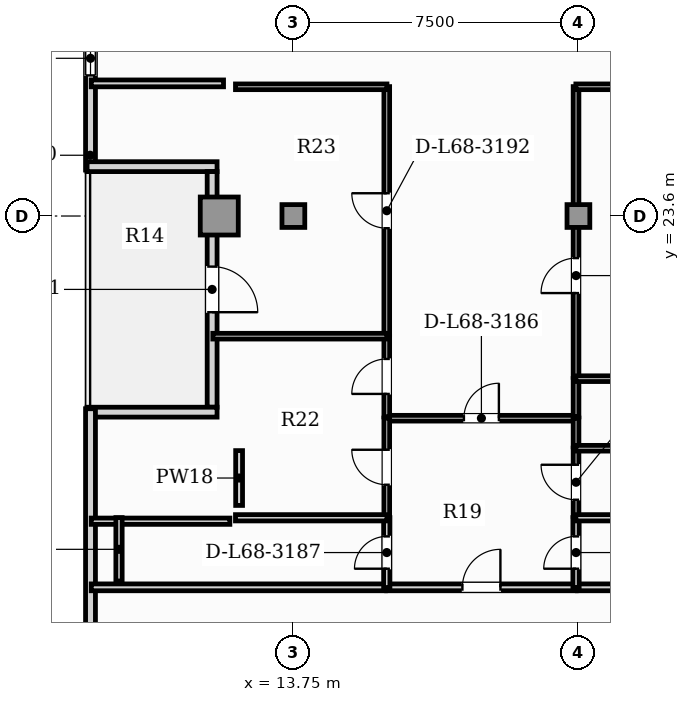
"""IFC4 building model, lengths in metres.
Left out: names, types, materials, properties, quantities, classifications, styles, units other than length and angle.
Written with IfcOpenShell. Run it as: python <this file> out.ifc"""

import sys

from ifc_helpers import new_model, si_unit, direction, frame, frame_2d, origin, origin_2d, place, context, subcontext, project, spatial, rectangle, hollow_rectangle, extrude, element, fill, save


model = new_model("IFC4")
c1 = context("Model", 3, precision=1e-05, world=origin(), true_north=direction((0.0, 1.0)))
c2 = subcontext(c1, "Body", "Model", "MODEL_VIEW")
j1 = project(units=[si_unit("LENGTHUNIT", "METRE"), si_unit("PLANEANGLEUNIT", "RADIAN")], contexts=[c1])
p1 = place(None, origin())
s1 = spatial("IfcSite", under=j1, at=p1, CompositionType="ELEMENT")
p2 = place(p1, origin())
s2 = spatial("IfcBuilding", under=s1, at=p2, CompositionType="ELEMENT")
p3 = place(p2, frame((0.0, 0.0, 276.0)))
s3 = spatial("IfcBuildingStorey", under=s2, at=p3, CompositionType="ELEMENT", Elevation=276.0)
p4 = place(p3, frame((11.8, 23.6, 0.0), z_axis=(0.0, 0.0, 1.0), x_axis=(1.0, 0.0, 0.0)))
e1 = element("IfcColumn", 1, at=p4, inside=s3, PredefinedType="USERDEFINED", context=c2, shape_type="SweptSolid", body=[
    extrude(hollow_rectangle(XDim=1.0, YDim=1.0, WallThickness=0.06, at=origin_2d()), origin(), (0.0, 0.0, 1.0), 5.05),
])
for number, where, z_axis, x_axis in (
    (2, (13.75, 23.6, 0.0), (0.0, 0.0, 1.0), (1.0, 0.0, 0.0)),
    (3, (21.25, 23.6, 0.0), (0.0, 0.0, 1.0), (1.0, 0.0, 0.0)),
):
    element("IfcColumn", number, at=place(p3, frame(where, z_axis=z_axis, x_axis=x_axis)), inside=s3, PredefinedType="COLUMN", context=c2, shape_type="SweptSolid", body=[
        extrude(rectangle(XDim=0.6, YDim=0.6, at=origin_2d()), origin(), (0.0, 0.0, 1.0), 5.05),
    ])
p5 = place(p3, frame((8.412, 31.698, 0.0), z_axis=(0.0, 0.0, 1.0), x_axis=(0.0, -1.0, 0.0)))
e4 = element("IfcWall", 4, at=p5, inside=s3, PredefinedType="SOLIDWALL", context=c2, shape_type="SweptSolid", body=[
    extrude(rectangle(XDim=6.889, YDim=0.26, at=frame_2d((3.444, 0.0))), origin(), (0.0, 0.0, 1.0), 4.85),
])
p6 = place(p5, frame((3.498, 0.0, 0.95)))
e5 = element("IfcOpeningElement", 5, at=p6, cuts=e4, PredefinedType="OPENING", context=c2, shape_type="SweptSolid", body=[
    extrude(rectangle(XDim=0.9, YDim=1.5, at=frame_2d((0.45, 0.75))), frame((0.0, 0.14, 0.0), z_axis=(0.0, -1.0, 0.0), x_axis=(1.0, 0.0, 0.0)), (0.0, 0.0, 1.0), 0.28),
])
p7 = place(p3, frame((8.322, 24.899, 0.0), z_axis=(0.0, 0.0, 1.0), x_axis=(1.0, 0.0, 0.0)))
e6 = element("IfcWall", 6, at=p7, inside=s3, PredefinedType="SOLIDWALL", context=c2, shape_type="SweptSolid", body=[
    extrude(rectangle(XDim=3.42, YDim=0.26, at=frame_2d((1.71, 0.0))), origin(), (0.0, 0.0, 1.0), 4.85),
])
p8 = place(p3, frame((11.612, 24.769, 0.0), z_axis=(0.0, 0.0, 1.0), x_axis=(0.0, -1.0, 0.0)))
e7 = element("IfcWall", 7, at=p8, inside=s3, PredefinedType="SOLIDWALL", context=c2, shape_type="SweptSolid", body=[
    extrude(rectangle(XDim=6.2, YDim=0.26, at=frame_2d((3.1, 0.0))), origin(), (0.0, 0.0, 1.0), 4.39),
])
p9 = place(p8, frame((2.5, 0.0, 0.0)))
e8 = element("IfcOpeningElement", 8, at=p9, cuts=e7, PredefinedType="OPENING", context=c2, shape_type="SweptSolid", body=[
    extrude(rectangle(XDim=1.2, YDim=2.2, at=frame_2d((0.6, 1.1))), frame((0.0, 0.14, 0.0), z_axis=(0.0, -1.0, 0.0), x_axis=(1.0, 0.0, 0.0)), (0.0, 0.0, 1.0), 0.28),
])
p10 = place(p3, frame((11.742, 18.439, 0.0), z_axis=(0.0, 0.0, 1.0), x_axis=(-1.0, 0.0, 0.0)))
e9 = element("IfcWall", 9, at=p10, inside=s3, PredefinedType="SOLIDWALL", context=c2, shape_type="SweptSolid", body=[
    extrude(rectangle(XDim=3.42, YDim=0.26, at=frame_2d((1.71, 0.0))), origin(), (0.0, 0.0, 1.0), 4.85),
])
p11 = place(p3, frame((8.412, 18.529, 0.0), z_axis=(0.0, 0.0, 1.0), x_axis=(0.0, -1.0, 0.0)))
e10 = element("IfcWall", 10, at=p11, inside=s3, PredefinedType="SOLIDWALL", context=c2, shape_type="SweptSolid", body=[
    extrude(rectangle(XDim=15.289, YDim=0.26, at=frame_2d((7.645, 0.0))), origin(), (0.0, 0.0, 1.0), 4.85),
])
p12 = place(p11, frame((9.239, 0.0, 0.85)))
e11 = element("IfcOpeningElement", 11, at=p12, cuts=e10, PredefinedType="OPENING", context=c2, shape_type="SweptSolid", body=[
    extrude(rectangle(XDim=2.4, YDim=2.0, at=frame_2d((1.2, 1.0))), frame((0.0, 0.14, 0.0), z_axis=(0.0, -1.0, 0.0), x_axis=(1.0, 0.0, 0.0)), (0.0, 0.0, 1.0), 0.28),
])
p13 = place(p3, frame((16.202, 13.83, 0.0), z_axis=(0.0, 0.0, 1.0), x_axis=(1.0, 0.0, 0.0)))
e12 = element("IfcWall", 12, at=p13, inside=s3, PredefinedType="PARTITIONING", context=c2, shape_type="SweptSolid", body=[
    extrude(rectangle(XDim=4.99, YDim=0.18, at=frame_2d((2.495, 0.0))), origin(), (0.0, 0.0, 1.0), 4.85),
])
p14 = place(p13, frame((1.995, 0.0, 0.0)))
e13 = element("IfcOpeningElement", 13, at=p14, cuts=e12, PredefinedType="OPENING", context=c2, shape_type="SweptSolid", body=[
    extrude(rectangle(XDim=1.0, YDim=2.15, at=frame_2d((0.5, 1.075))), frame((0.0, 0.1, 0.0), z_axis=(0.0, -1.0, 0.0), x_axis=(1.0, 0.0, 0.0)), (0.0, 0.0, 1.0), 0.2),
])
p15 = place(p3, frame((8.431, 13.83, 0.0), z_axis=(0.0, 0.0, 1.0), x_axis=(1.0, 0.0, 0.0)))
e14 = element("IfcWall", 14, at=p15, inside=s3, PredefinedType="PARTITIONING", context=c2, shape_type="SweptSolid", body=[
    extrude(rectangle(XDim=7.741, YDim=0.18, at=frame_2d((3.871, 0.0))), origin(), (0.0, 0.0, 1.0), 4.85),
])
p16 = place(p3, frame((21.222, 13.83, 0.0), z_axis=(0.0, 0.0, 1.0), x_axis=(1.0, 0.0, 0.0)))
e15 = element("IfcWall", 15, at=p16, inside=s3, PredefinedType="PARTITIONING", context=c2, shape_type="SweptSolid", body=[
    extrude(rectangle(XDim=7.185, YDim=0.18, at=frame_2d((3.593, 0.0))), origin(), (0.0, 0.0, 1.0), 4.85),
])
p17 = place(p3, frame((16.202, 18.28, 0.0), z_axis=(0.0, 0.0, 1.0), x_axis=(1.0, 0.0, 0.0)))
e16 = element("IfcWall", 16, at=p17, inside=s3, PredefinedType="PARTITIONING", context=c2, shape_type="SweptSolid", body=[
    extrude(rectangle(XDim=4.99, YDim=0.15, at=frame_2d((2.495, 0.0))), origin(), (0.0, 0.0, 1.0), 4.85),
])
p18 = place(p17, frame((2.035, 0.0, 0.0)))
e17 = element("IfcOpeningElement", 17, at=p18, cuts=e16, PredefinedType="OPENING", context=c2, shape_type="SweptSolid", body=[
    extrude(rectangle(XDim=0.92, YDim=2.1, at=frame_2d((0.46, 1.05))), frame((0.0, 0.085, 0.0), z_axis=(0.0, -1.0, 0.0), x_axis=(1.0, 0.0, 0.0)), (0.0, 0.0, 1.0), 0.17),
])
p19 = place(p3, frame((16.208, 13.825, 0.0), z_axis=(0.0, 0.0, 1.0), x_axis=(0.0, 1.0, 0.0)))
e18 = element("IfcWall", 18, at=p19, inside=s3, PredefinedType="PLUMBINGWALL", context=c2, shape_type="SweptSolid", body=[
    extrude(rectangle(XDim=1.84, YDim=0.165, at=frame_2d((0.92, 0.0))), origin(), (0.0, 0.0, 1.0), 4.85),
])
p20 = place(p19, frame((0.495, 0.0, 0.0)))
e19 = element("IfcOpeningElement", 19, at=p20, cuts=e18, PredefinedType="OPENING", context=c2, shape_type="SweptSolid", body=[
    extrude(rectangle(XDim=0.85, YDim=2.1, at=frame_2d((0.425, 1.05))), frame((0.0, 0.093, 0.0), z_axis=(0.0, -1.0, 0.0), x_axis=(1.0, 0.0, 0.0)), (0.0, 0.0, 1.0), 0.185),
])
p21 = place(p3, frame((16.208, 15.695, 0.0), z_axis=(0.0, 0.0, 1.0), x_axis=(0.0, 1.0, 0.0)))
e20 = element("IfcWall", 20, at=p21, inside=s3, PredefinedType="PARTITIONING", context=c2, shape_type="SweptSolid", body=[
    extrude(rectangle(XDim=2.59, YDim=0.15, at=frame_2d((1.295, 0.0))), origin(), (0.0, 0.0, 1.0), 4.85),
])
p22 = place(p21, frame((0.835, 0.0, 0.0)))
e21 = element("IfcOpeningElement", 21, at=p22, cuts=e20, PredefinedType="OPENING", context=c2, shape_type="SweptSolid", body=[
    extrude(rectangle(XDim=0.92, YDim=2.1, at=frame_2d((0.46, 1.05))), frame((0.0, 0.085, 0.0), z_axis=(0.0, -1.0, 0.0), x_axis=(1.0, 0.0, 0.0)), (0.0, 0.0, 1.0), 0.17),
])
p23 = place(p3, frame((21.188, 13.825, 0.0), z_axis=(0.0, 0.0, 1.0), x_axis=(0.0, 1.0, 0.0)))
e22 = element("IfcWall", 22, at=p23, inside=s3, PredefinedType="PLUMBINGWALL", context=c2, shape_type="SweptSolid", body=[
    extrude(rectangle(XDim=1.84, YDim=0.165, at=frame_2d((0.92, 0.0))), origin(), (0.0, 0.0, 1.0), 4.495),
])
p24 = place(p23, frame((0.495, 0.0, 0.0)))
e23 = element("IfcOpeningElement", 23, at=p24, cuts=e22, PredefinedType="OPENING", context=c2, shape_type="SweptSolid", body=[
    extrude(rectangle(XDim=0.85, YDim=2.1, at=frame_2d((0.425, 1.05))), frame((0.0, 0.093, 0.0), z_axis=(0.0, -1.0, 0.0), x_axis=(1.0, 0.0, 0.0)), (0.0, 0.0, 1.0), 0.185),
])
p25 = place(p3, frame((21.188, 15.695, 0.0), z_axis=(0.0, 0.0, 1.0), x_axis=(0.0, 1.0, 0.0)))
e24 = element("IfcWall", 24, at=p25, inside=s3, PredefinedType="PARTITIONING", context=c2, shape_type="SweptSolid", body=[
    extrude(rectangle(XDim=1.8, YDim=0.15, at=frame_2d((0.9, 0.0))), origin(), (0.0, 0.0, 1.0), 4.495),
])
p26 = place(p25, frame((0.44, 0.0, 0.0)))
e25 = element("IfcOpeningElement", 25, at=p26, cuts=e24, PredefinedType="OPENING", context=c2, shape_type="SweptSolid", body=[
    extrude(rectangle(XDim=0.92, YDim=2.1, at=frame_2d((0.46, 1.05))), frame((0.0, 0.085, 0.0), z_axis=(0.0, -1.0, 0.0), x_axis=(1.0, 0.0, 0.0)), (0.0, 0.0, 1.0), 0.17),
])
p27 = place(p3, frame((21.188, 17.525, 0.0), z_axis=(0.0, 0.0, 1.0), x_axis=(0.0, 1.0, 0.0)))
e26 = element("IfcWall", 26, at=p27, inside=s3, PredefinedType="PARTITIONING", context=c2, shape_type="SweptSolid", body=[
    extrude(rectangle(XDim=0.76, YDim=0.15, at=frame_2d((0.38, 0.0))), origin(), (0.0, 0.0, 1.0), 4.495),
])
p28 = place(p3, frame((16.208, 18.315, 0.0), z_axis=(0.0, 0.0, 1.0), x_axis=(0.0, 1.0, 0.0)))
e27 = element("IfcWall", 27, at=p28, inside=s3, PredefinedType="PARTITIONING", context=c2, shape_type="SweptSolid", body=[
    extrude(rectangle(XDim=2.128, YDim=0.15, at=frame_2d((1.064, 0.0))), origin(), (0.0, 0.0, 1.0), 4.85),
])
p29 = place(p28, frame((0.604, 0.0, 0.0)))
e28 = element("IfcOpeningElement", 28, at=p29, cuts=e27, PredefinedType="OPENING", context=c2, shape_type="SweptSolid", body=[
    extrude(rectangle(XDim=0.92, YDim=2.1, at=frame_2d((0.46, 1.05))), frame((0.0, 0.085, 0.0), z_axis=(0.0, -1.0, 0.0), x_axis=(1.0, 0.0, 0.0)), (0.0, 0.0, 1.0), 0.17),
])
p30 = place(p3, frame((16.208, 20.473, 0.0), z_axis=(0.0, 0.0, 1.0), x_axis=(0.0, 1.0, 0.0)))
e29 = element("IfcWall", 29, at=p30, inside=s3, PredefinedType="PARTITIONING", context=c2, shape_type="SweptSolid", body=[
    extrude(rectangle(XDim=6.532, YDim=0.15, at=frame_2d((3.266, 0.0))), origin(), (0.0, 0.0, 1.0), 4.85),
])
p31 = place(p30, frame((2.806, 0.0, 0.0)))
e30 = element("IfcOpeningElement", 30, at=p31, cuts=e29, PredefinedType="OPENING", context=c2, shape_type="SweptSolid", body=[
    extrude(rectangle(XDim=0.92, YDim=2.1, at=frame_2d((0.46, 1.05))), frame((0.0, 0.085, 0.0), z_axis=(0.0, -1.0, 0.0), x_axis=(1.0, 0.0, 0.0)), (0.0, 0.0, 1.0), 0.17),
])
p32 = place(p3, frame((12.227, 27.0, 0.0), z_axis=(0.0, 0.0, 1.0), x_axis=(1.0, 0.0, 0.0)))
e31 = element("IfcWall", 31, at=p32, inside=s3, PredefinedType="PARTITIONING", context=c2, shape_type="SweptSolid", body=[
    extrude(rectangle(XDim=3.985, YDim=0.15, at=frame_2d((1.993, 0.0))), origin(), (0.0, 0.0, 1.0), 4.85),
])
p33 = place(p3, frame((21.188, 18.315, 0.0), z_axis=(0.0, 0.0, 1.0), x_axis=(0.0, 1.0, 0.0)))
e32 = element("IfcWall", 32, at=p33, inside=s3, PredefinedType="PARTITIONING", context=c2, shape_type="SweptSolid", body=[
    extrude(rectangle(XDim=1.01, YDim=0.15, at=frame_2d((0.505, 0.0))), origin(), (0.0, 0.0, 1.0), 4.495),
])
p34 = place(p3, frame((21.188, 19.355, 0.0), z_axis=(0.0, 0.0, 1.0), x_axis=(0.0, 1.0, 0.0)))
e33 = element("IfcWall", 33, at=p34, inside=s3, PredefinedType="PARTITIONING", context=c2, shape_type="SweptSolid", body=[
    extrude(rectangle(XDim=7.65, YDim=0.15, at=frame_2d((3.825, 0.0))), origin(), (0.0, 0.0, 1.0), 4.495),
])
p35 = place(p34, frame((2.218, 0.0, 0.0)))
e34 = element("IfcOpeningElement", 34, at=p35, cuts=e33, PredefinedType="OPENING", context=c2, shape_type="SweptSolid", body=[
    extrude(rectangle(XDim=0.92, YDim=2.1, at=frame_2d((0.46, 1.05))), frame((0.0, 0.085, 0.0), z_axis=(0.0, -1.0, 0.0), x_axis=(1.0, 0.0, 0.0)), (0.0, 0.0, 1.0), 0.17),
])
p36 = place(p3, frame((21.183, 27.0, 0.0), z_axis=(0.0, 0.0, 1.0), x_axis=(1.0, 0.0, 0.0)))
e35 = element("IfcWall", 35, at=p36, inside=s3, PredefinedType="PARTITIONING", context=c2, shape_type="SweptSolid", body=[
    extrude(rectangle(XDim=7.225, YDim=0.15, at=frame_2d((3.613, 0.0))), origin(), (0.0, 0.0, 1.0), 4.85),
])
p37 = place(p3, frame((12.227, 15.66, 0.0), z_axis=(0.0, 0.0, 1.0), x_axis=(1.0, 0.0, 0.0)))
e36 = element("IfcWall", 36, at=p37, inside=s3, PredefinedType="PLUMBINGWALL", context=c2, shape_type="SweptSolid", body=[
    extrude(rectangle(XDim=3.985, YDim=0.165, at=frame_2d((1.993, 0.0))), origin(), (0.0, 0.0, 1.0), 4.85),
])
p38 = place(p3, frame((11.632, 20.438, 0.0), z_axis=(0.0, 0.0, 1.0), x_axis=(1.0, 0.0, 0.0)))
e37 = element("IfcWall", 37, at=p38, inside=s3, PredefinedType="PARTITIONING", context=c2, shape_type="SweptSolid", body=[
    extrude(rectangle(XDim=4.581, YDim=0.15, at=frame_2d((2.291, 0.0))), origin(), (0.0, 0.0, 1.0), 4.85),
])
p39 = place(p3, frame((21.183, 15.66, 0.0), z_axis=(0.0, 0.0, 1.0), x_axis=(1.0, 0.0, 0.0)))
e38 = element("IfcWall", 38, at=p39, inside=s3, PredefinedType="PLUMBINGWALL", context=c2, shape_type="SweptSolid", body=[
    extrude(rectangle(XDim=7.225, YDim=0.165, at=frame_2d((3.613, 0.0))), origin(), (0.0, 0.0, 1.0), 4.85),
])
p40 = place(p3, frame((21.183, 17.49, 0.0), z_axis=(0.0, 0.0, 1.0), x_axis=(1.0, 0.0, 0.0)))
e39 = element("IfcWall", 39, at=p40, inside=s3, PredefinedType="PARTITIONING", context=c2, shape_type="SweptSolid", body=[
    extrude(rectangle(XDim=7.225, YDim=0.15, at=frame_2d((3.613, 0.0))), origin(), (0.0, 0.0, 1.0), 4.85),
])
p41 = place(p40, frame((3.153, 0.0, 0.0)))
e40 = element("IfcOpeningElement", 40, at=p41, cuts=e39, PredefinedType="OPENING", context=c2, shape_type="SweptSolid", body=[
    extrude(rectangle(XDim=0.92, YDim=2.1, at=frame_2d((0.46, 1.05))), frame((0.0, 0.085, 0.0), z_axis=(0.0, -1.0, 0.0), x_axis=(1.0, 0.0, 0.0)), (0.0, 0.0, 1.0), 0.17),
])
p42 = place(p3, frame((21.183, 19.32, 0.0), z_axis=(0.0, 0.0, 1.0), x_axis=(1.0, 0.0, 0.0)))
e41 = element("IfcWall", 41, at=p42, inside=s3, PredefinedType="PARTITIONING", context=c2, shape_type="SweptSolid", body=[
    extrude(rectangle(XDim=7.225, YDim=0.15, at=frame_2d((3.613, 0.0))), origin(), (0.0, 0.0, 1.0), 4.85),
])
p43 = place(p3, frame((11.912, 27.09, 0.0), z_axis=(0.0, 0.0, 1.0), x_axis=(-1.0, 0.0, 0.0)))
e42 = element("IfcWall", 42, at=p43, inside=s3, PredefinedType="PARTITIONING", context=c2, shape_type="SweptSolid", body=[
    extrude(rectangle(XDim=3.481, YDim=0.18, at=frame_2d((1.74, 0.0))), origin(), (0.0, 0.0, 1.0), 4.85),
])
p44 = place(p3, frame((8.431, 15.57, 0.0), z_axis=(0.0, 0.0, 1.0), x_axis=(1.0, 0.0, 0.0)))
e43 = element("IfcWall", 43, at=p44, inside=s3, PredefinedType="PLUMBINGWALL", context=c2, shape_type="SweptSolid", body=[
    extrude(rectangle(XDim=3.647, YDim=0.165, at=frame_2d((1.823, 0.0))), origin(), (0.0, 0.0, 1.0), 4.85),
])
p45 = place(p3, frame((9.162, 13.995, 0.0), z_axis=(0.0, 0.0, 1.0), x_axis=(0.0, 1.0, 0.0)))
e44 = element("IfcWall", 44, at=p45, inside=s3, PredefinedType="PLUMBINGWALL", context=c2, shape_type="SweptSolid", body=[
    extrude(rectangle(XDim=1.67, YDim=0.165, at=frame_2d((0.835, 0.0))), origin(), (0.0, 0.0, 1.0), 4.85),
])
p46 = place(p3, frame((12.322, 15.985, 0.0), z_axis=(0.0, 0.0, 1.0), x_axis=(0.0, 1.0, 0.0)))
e45 = element("IfcWall", 45, at=p46, inside=s3, PredefinedType="PARTITIONING", context=c2, shape_type="SweptSolid", body=[
    extrude(rectangle(XDim=1.442, YDim=0.18, at=frame_2d((0.721, 0.0))), origin(), (0.0, 0.0, 1.0), 4.85),
])
p47 = place(p9, frame((1.2, 0.0, 0.0), z_axis=(0.0, 0.0, 1.0), x_axis=(-1.0, 0.0, 0.0)))
e46 = element("IfcDoor", 46, at=p47, inside=s3, OperationType="SINGLE_SWING_LEFT", PredefinedType="DOOR", context=c2, shape_type="SweptSolid", body=[
    extrude(rectangle(XDim=1.2, YDim=2.2, at=frame_2d((0.6, 1.1))), frame((0.0, 0.025, 0.0), z_axis=(0.0, -1.0, 0.0), x_axis=(1.0, 0.0, 0.0)), (0.0, 0.0, 1.0), 0.05),
])
fill(e8, e46)
p48 = place(p6, origin())
e47 = element("IfcWindow", 47, at=p48, inside=s3, PartitioningType="SINGLE_PANEL", PredefinedType="WINDOW", context=c2, shape_type="SweptSolid", body=[
    extrude(rectangle(XDim=0.9, YDim=1.5, at=frame_2d((0.45, 0.75))), frame((0.0, 0.03, 0.0), z_axis=(0.0, -1.0, 0.0), x_axis=(1.0, 0.0, 0.0)), (0.0, 0.0, 1.0), 0.06),
])
fill(e5, e47)
p49 = place(p14, origin())
e48 = element("IfcDoor", 48, at=p49, inside=s3, OperationType="SINGLE_SWING_RIGHT", PredefinedType="DOOR", context=c2, shape_type="SweptSolid", body=[
    extrude(rectangle(XDim=1.0, YDim=2.15, at=frame_2d((0.5, 1.075))), frame((0.0, 0.025, 0.0), z_axis=(0.0, -1.0, 0.0), x_axis=(1.0, 0.0, 0.0)), (0.0, 0.0, 1.0), 0.05),
])
fill(e13, e48)
p50 = place(p18, origin())
e49 = element("IfcDoor", 49, at=p50, inside=s3, OperationType="SINGLE_SWING_RIGHT", PredefinedType="DOOR", context=c2, shape_type="SweptSolid", body=[
    extrude(rectangle(XDim=0.92, YDim=2.1, at=frame_2d((0.46, 1.05))), frame((0.0, 0.025, 0.0), z_axis=(0.0, -1.0, 0.0), x_axis=(1.0, 0.0, 0.0)), (0.0, 0.0, 1.0), 0.05),
])
fill(e17, e49)
p51 = place(p20, origin())
e50 = element("IfcDoor", 50, at=p51, inside=s3, OperationType="SINGLE_SWING_LEFT", PredefinedType="DOOR", context=c2, shape_type="SweptSolid", body=[
    extrude(rectangle(XDim=0.85, YDim=2.1, at=frame_2d((0.425, 1.05))), frame((0.0, 0.025, 0.0), z_axis=(0.0, -1.0, 0.0), x_axis=(1.0, 0.0, 0.0)), (0.0, 0.0, 1.0), 0.05),
])
fill(e19, e50)
p52 = place(p22, origin())
e51 = element("IfcDoor", 51, at=p52, inside=s3, OperationType="SINGLE_SWING_RIGHT", PredefinedType="DOOR", context=c2, shape_type="SweptSolid", body=[
    extrude(rectangle(XDim=0.92, YDim=2.1, at=frame_2d((0.46, 1.05))), frame((0.0, 0.025, 0.0), z_axis=(0.0, -1.0, 0.0), x_axis=(1.0, 0.0, 0.0)), (0.0, 0.0, 1.0), 0.05),
])
fill(e21, e51)
p53 = place(p24, origin())
e52 = element("IfcDoor", 52, at=p53, inside=s3, OperationType="SINGLE_SWING_LEFT", PredefinedType="DOOR", context=c2, shape_type="SweptSolid", body=[
    extrude(rectangle(XDim=0.85, YDim=2.1, at=frame_2d((0.425, 1.05))), frame((0.0, 0.025, 0.0), z_axis=(0.0, -1.0, 0.0), x_axis=(1.0, 0.0, 0.0)), (0.0, 0.0, 1.0), 0.05),
])
fill(e23, e52)
p54 = place(p26, origin())
e53 = element("IfcDoor", 53, at=p54, inside=s3, OperationType="SINGLE_SWING_RIGHT", PredefinedType="DOOR", context=c2, shape_type="SweptSolid", body=[
    extrude(rectangle(XDim=0.92, YDim=2.1, at=frame_2d((0.46, 1.05))), frame((0.0, 0.025, 0.0), z_axis=(0.0, -1.0, 0.0), x_axis=(1.0, 0.0, 0.0)), (0.0, 0.0, 1.0), 0.05),
])
fill(e25, e53)
p55 = place(p29, origin())
e54 = element("IfcDoor", 54, at=p55, inside=s3, OperationType="SINGLE_SWING_LEFT", PredefinedType="DOOR", context=c2, shape_type="SweptSolid", body=[
    extrude(rectangle(XDim=0.92, YDim=2.1, at=frame_2d((0.46, 1.05))), frame((0.0, 0.025, 0.0), z_axis=(0.0, -1.0, 0.0), x_axis=(1.0, 0.0, 0.0)), (0.0, 0.0, 1.0), 0.05),
])
fill(e28, e54)
p56 = place(p31, origin())
e55 = element("IfcDoor", 55, at=p56, inside=s3, OperationType="SINGLE_SWING_RIGHT", PredefinedType="DOOR", context=c2, shape_type="SweptSolid", body=[
    extrude(rectangle(XDim=0.92, YDim=2.1, at=frame_2d((0.46, 1.05))), frame((0.0, 0.025, 0.0), z_axis=(0.0, -1.0, 0.0), x_axis=(1.0, 0.0, 0.0)), (0.0, 0.0, 1.0), 0.05),
])
fill(e30, e55)
p57 = place(p35, origin())
e56 = element("IfcDoor", 56, at=p57, inside=s3, OperationType="SINGLE_SWING_LEFT", PredefinedType="DOOR", context=c2, shape_type="SweptSolid", body=[
    extrude(rectangle(XDim=0.92, YDim=2.1, at=frame_2d((0.46, 1.05))), frame((0.0, 0.025, 0.0), z_axis=(0.0, -1.0, 0.0), x_axis=(1.0, 0.0, 0.0)), (0.0, 0.0, 1.0), 0.05),
])
fill(e34, e56)
save(model, sys.argv[1])
